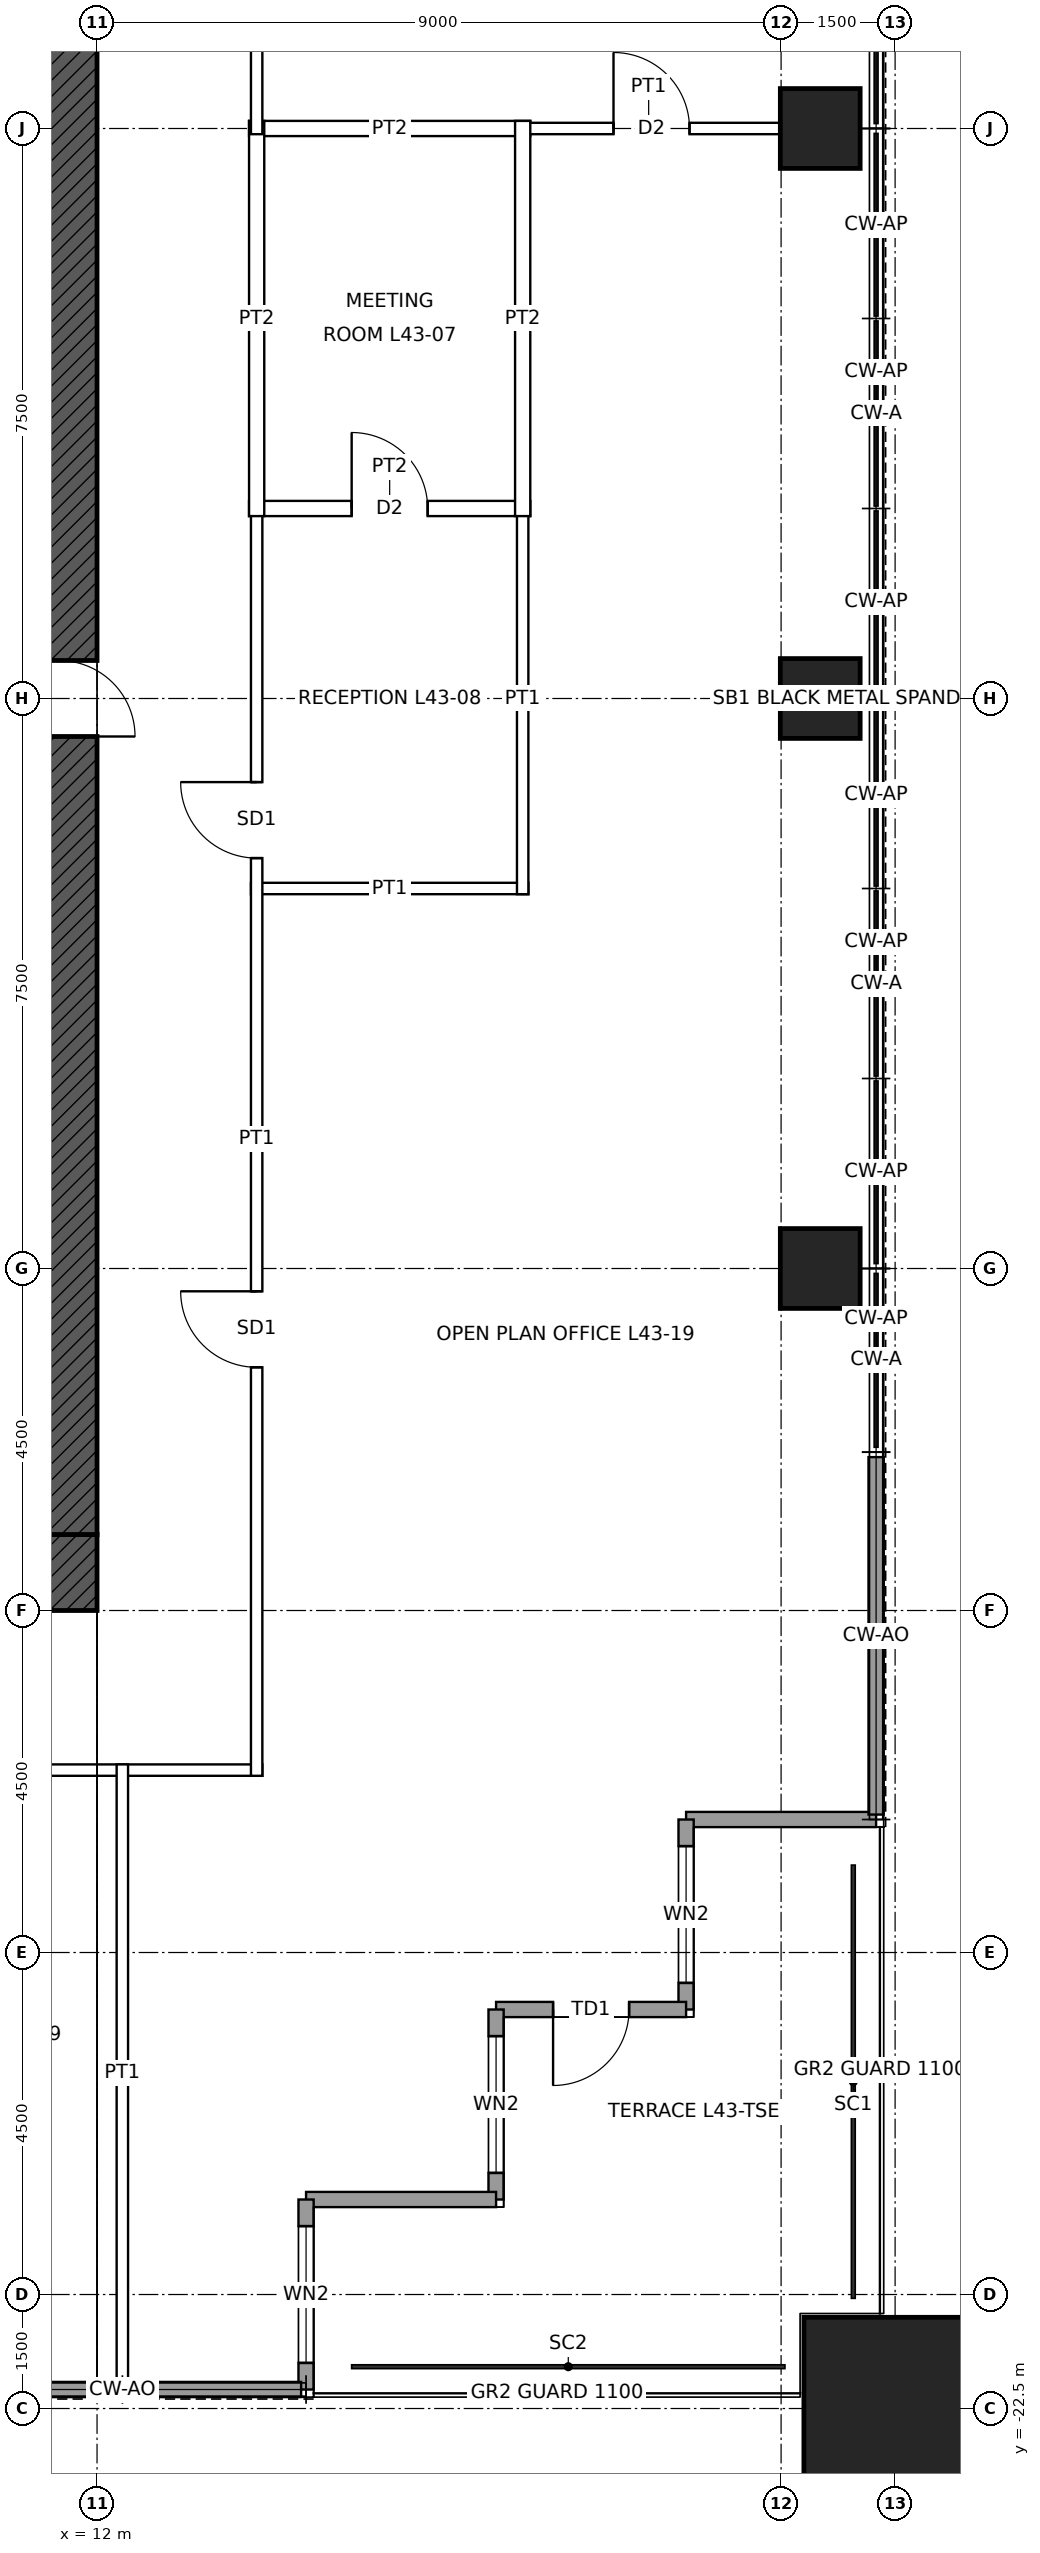
"""IFC4 building model, lengths in metres.
Left out: names, types, materials, properties, quantities, classifications, styles, units other than length and angle.
Written with IfcOpenShell. Run it as: python <this file> out.ifc"""

import sys

from ifc_helpers import new_model, si_unit, direction, frame, frame_2d, origin, origin_2d, place, context, subcontext, project, spatial, rectangle, hollow_rectangle, extrude, element, fill, save


model = new_model("IFC4")
c1 = context("Model", 3, precision=1e-05, world=origin(), true_north=direction((0.0, 1.0)))
c2 = subcontext(c1, "Body", "Model", "MODEL_VIEW")
j1 = project(units=[si_unit("LENGTHUNIT", "METRE"), si_unit("PLANEANGLEUNIT", "RADIAN")], contexts=[c1])
p1 = place(None, origin())
s1 = spatial("IfcSite", under=j1, at=p1, CompositionType="ELEMENT")
p2 = place(p1, origin())
s2 = spatial("IfcBuilding", under=s1, at=p2, CompositionType="ELEMENT")
p3 = place(p2, frame((0.0, 0.0, 205.9)))
s3 = spatial("IfcBuildingStorey", under=s2, at=p3, CompositionType="ELEMENT", Elevation=205.9)
p4 = place(p3, frame((22.5, -22.5, 0.0), z_axis=(0.0, 0.0, 1.0), x_axis=(1.0, 0.0, 0.0)))
e1 = element("IfcColumn", 1, at=p4, inside=s3, PredefinedType="COLUMN", context=c2, shape_type="SweptSolid", body=[
    extrude(hollow_rectangle(XDim=2.4, YDim=2.4, WallThickness=0.12, at=origin_2d()), origin(), (0.0, 0.0, 1.0), 4.0),
])
for number, where, z_axis, x_axis in (
    (2, (21.515, 7.5, 0.0), (0.0, 0.0, 1.0), (1.0, 0.0, 0.0)),
    (3, (21.515, 0.0, 0.0), (0.0, 0.0, 1.0), (1.0, 0.0, 0.0)),
    (4, (21.515, -7.5, 0.0), (0.0, 0.0, 1.0), (1.0, 0.0, 0.0)),
):
    element("IfcColumn", number, at=place(p3, frame(where, z_axis=z_axis, x_axis=x_axis)), inside=s3, PredefinedType="COLUMN", context=c2, shape_type="SweptSolid", body=[
        extrude(hollow_rectangle(XDim=1.05, YDim=1.05, WallThickness=0.07, at=origin_2d()), origin(), (0.0, 0.0, 1.0), 4.0),
    ])
p5 = place(p3, frame((12.0, -11.5, 0.0), z_axis=(0.0, 0.0, 1.0), x_axis=(-1.0, 0.0, 0.0)))
e5 = element("IfcWall", 5, at=p5, inside=s3, PredefinedType="SHEAR", context=c2, shape_type="SweptSolid", body=[
    extrude(rectangle(XDim=24.0, YDim=1.0, at=frame_2d((12.0, 0.0))), origin(), (0.0, 0.0, 1.0), 4.0),
])
p6 = place(p5, frame((11.5, 0.0, 0.0)))
e6 = element("IfcOpeningElement", 6, at=p6, cuts=e5, PredefinedType="OPENING", context=c2, shape_type="SweptSolid", body=[
    extrude(rectangle(XDim=1.0, YDim=2.1, at=frame_2d((0.5, 1.05))), frame((0.0, 0.51, 0.0), z_axis=(0.0, -1.0, 0.0), x_axis=(1.0, 0.0, 0.0)), (0.0, 0.0, 1.0), 1.02),
])
p7 = place(p5, frame((1.0, 0.0, 0.0)))
e7 = element("IfcOpeningElement", 7, at=p7, cuts=e5, PredefinedType="OPENING", context=c2, shape_type="SweptSolid", body=[
    extrude(rectangle(XDim=1.0, YDim=2.4, at=frame_2d((0.5, 1.2))), frame((0.0, 0.51, 0.0), z_axis=(0.0, -1.0, 0.0), x_axis=(1.0, 0.0, 0.0)), (0.0, 0.0, 1.0), 1.02),
])
p8 = place(p3, frame((11.5, 11.0, 0.0), z_axis=(0.0, 0.0, 1.0), x_axis=(0.0, -1.0, 0.0)))
e8 = element("IfcWall", 8, at=p8, inside=s3, PredefinedType="SHEAR", context=c2, shape_type="SweptSolid", body=[
    extrude(rectangle(XDim=22.0, YDim=1.0, at=frame_2d((11.0, 0.0))), origin(), (0.0, 0.0, 1.0), 4.0),
])
p9 = place(p8, frame((10.5, 0.0, 0.0)))
e9 = element("IfcOpeningElement", 9, at=p9, cuts=e8, PredefinedType="OPENING", context=c2, shape_type="SweptSolid", body=[
    extrude(rectangle(XDim=1.0, YDim=2.4, at=frame_2d((0.5, 1.2))), frame((0.0, 0.51, 0.0), z_axis=(0.0, -1.0, 0.0), x_axis=(1.0, 0.0, 0.0)), (0.0, 0.0, 1.0), 1.02),
])
p10 = place(p3, frame((22.25, -14.75, 0.0), z_axis=(0.0, 0.0, 1.0), x_axis=(-1.0, 0.0, 0.0)))
e10 = element("IfcWall", 10, at=p10, inside=s3, PredefinedType="SOLIDWALL", context=c2, shape_type="SweptSolid", body=[
    extrude(rectangle(XDim=2.5, YDim=0.2, at=frame_2d((1.25, 0.0))), origin(), (0.0, 0.0, 1.0), 3.85),
])
p11 = place(p3, frame((19.75, -14.75, 0.0), z_axis=(0.0, 0.0, 1.0), x_axis=(0.0, -1.0, 0.0)))
e11 = element("IfcWall", 11, at=p11, inside=s3, PredefinedType="SOLIDWALL", context=c2, shape_type="SweptSolid", body=[
    extrude(rectangle(XDim=2.5, YDim=0.2, at=frame_2d((1.25, 0.0))), origin(), (0.0, 0.0, 1.0), 3.85),
])
p12 = place(p11, frame((0.35, 0.0, 0.3)))
e12 = element("IfcOpeningElement", 12, at=p12, cuts=e11, PredefinedType="OPENING", context=c2, shape_type="SweptSolid", body=[
    extrude(rectangle(XDim=1.8, YDim=2.4, at=frame_2d((0.9, 1.2))), frame((0.0, 0.11, 0.0), z_axis=(0.0, -1.0, 0.0), x_axis=(1.0, 0.0, 0.0)), (0.0, 0.0, 1.0), 0.22),
])
p13 = place(p3, frame((19.75, -17.25, 0.0), z_axis=(0.0, 0.0, 1.0), x_axis=(-1.0, 0.0, 0.0)))
e13 = element("IfcWall", 13, at=p13, inside=s3, PredefinedType="SOLIDWALL", context=c2, shape_type="SweptSolid", body=[
    extrude(rectangle(XDim=2.5, YDim=0.2, at=frame_2d((1.25, 0.0))), origin(), (0.0, 0.0, 1.0), 3.85),
])
p14 = place(p13, frame((0.75, 0.0, 0.0)))
e14 = element("IfcOpeningElement", 14, at=p14, cuts=e13, PredefinedType="OPENING", context=c2, shape_type="SweptSolid", body=[
    extrude(rectangle(XDim=1.0, YDim=2.4, at=frame_2d((0.5, 1.2))), frame((0.0, 0.11, 0.0), z_axis=(0.0, -1.0, 0.0), x_axis=(1.0, 0.0, 0.0)), (0.0, 0.0, 1.0), 0.22),
])
p15 = place(p3, frame((17.25, -17.25, 0.0), z_axis=(0.0, 0.0, 1.0), x_axis=(0.0, -1.0, 0.0)))
e15 = element("IfcWall", 15, at=p15, inside=s3, PredefinedType="SOLIDWALL", context=c2, shape_type="SweptSolid", body=[
    extrude(rectangle(XDim=2.5, YDim=0.2, at=frame_2d((1.25, 0.0))), origin(), (0.0, 0.0, 1.0), 3.85),
])
p16 = place(p15, frame((0.35, 0.0, 0.3)))
e16 = element("IfcOpeningElement", 16, at=p16, cuts=e15, PredefinedType="OPENING", context=c2, shape_type="SweptSolid", body=[
    extrude(rectangle(XDim=1.8, YDim=2.4, at=frame_2d((0.9, 1.2))), frame((0.0, 0.11, 0.0), z_axis=(0.0, -1.0, 0.0), x_axis=(1.0, 0.0, 0.0)), (0.0, 0.0, 1.0), 0.22),
])
p17 = place(p3, frame((17.25, -19.75, 0.0), z_axis=(0.0, 0.0, 1.0), x_axis=(-1.0, 0.0, 0.0)))
e17 = element("IfcWall", 17, at=p17, inside=s3, PredefinedType="SOLIDWALL", context=c2, shape_type="SweptSolid", body=[
    extrude(rectangle(XDim=2.5, YDim=0.2, at=frame_2d((1.25, 0.0))), origin(), (0.0, 0.0, 1.0), 3.85),
])
p18 = place(p3, frame((14.75, -19.75, 0.0), z_axis=(0.0, 0.0, 1.0), x_axis=(0.0, -1.0, 0.0)))
e18 = element("IfcWall", 18, at=p18, inside=s3, PredefinedType="SOLIDWALL", context=c2, shape_type="SweptSolid", body=[
    extrude(rectangle(XDim=2.5, YDim=0.2, at=frame_2d((1.25, 0.0))), origin(), (0.0, 0.0, 1.0), 3.85),
])
p19 = place(p18, frame((0.35, 0.0, 0.3)))
e19 = element("IfcOpeningElement", 19, at=p19, cuts=e18, PredefinedType="OPENING", context=c2, shape_type="SweptSolid", body=[
    extrude(rectangle(XDim=1.8, YDim=2.4, at=frame_2d((0.9, 1.2))), frame((0.0, 0.11, 0.0), z_axis=(0.0, -1.0, 0.0), x_axis=(1.0, 0.0, 0.0)), (0.0, 0.0, 1.0), 0.22),
])
for number, where, z_axis, x_axis in (
    (20, (22.25, -9.982, 0.0), (0.0, 0.0, 1.0), (0.0, -1.0, 0.0)),
    (21, (22.25, -12.366, 0.0), (0.0, 0.0, 1.0), (0.0, -1.0, 0.0)),
    (22, (14.685, -22.25, 0.0), (0.0, 0.0, 1.0), (-1.0, 0.0, 0.0)),
    (23, (12.301, -22.25, 0.0), (0.0, 0.0, 1.0), (-1.0, 0.0, 0.0)),
):
    element("IfcWall", number, at=place(p3, frame(where, z_axis=z_axis, x_axis=x_axis)), inside=s3, PredefinedType="SOLIDWALL", context=c2, shape_type="SweptSolid", body=[
        extrude(rectangle(XDim=2.319, YDim=0.2, at=frame_2d((1.16, 0.0))), origin(), (0.0, 0.0, 1.0), 3.85),
    ])
p20 = place(p3, frame((-14.175, -14.1, 0.0), z_axis=(0.0, 0.0, 1.0), x_axis=(1.0, 0.0, 0.0)))
e24 = element("IfcWall", 24, at=p20, inside=s3, PredefinedType="PARTITIONING", context=c2, shape_type="SweptSolid", body=[
    extrude(rectangle(XDim=28.35, YDim=0.15, at=frame_2d((14.175, 0.0))), origin(), (0.0, 0.0, 1.0), 3.85),
])
p21 = place(p20, frame((7.425, 0.0, 0.0)))
e25 = element("IfcOpeningElement", 25, at=p21, cuts=e24, PredefinedType="OPENING", context=c2, shape_type="SweptSolid", body=[
    extrude(rectangle(XDim=1.0, YDim=2.4, at=frame_2d((0.5, 1.2))), frame((0.0, 0.085, 0.0), z_axis=(0.0, -1.0, 0.0), x_axis=(1.0, 0.0, 0.0)), (0.0, 0.0, 1.0), 0.17),
])
p22 = place(p20, frame((16.175, 0.0, 0.0)))
e26 = element("IfcOpeningElement", 26, at=p22, cuts=e24, PredefinedType="OPENING", context=c2, shape_type="SweptSolid", body=[
    extrude(rectangle(XDim=1.0, YDim=2.4, at=frame_2d((0.5, 1.2))), frame((0.0, 0.085, 0.0), z_axis=(0.0, -1.0, 0.0), x_axis=(1.0, 0.0, 0.0)), (0.0, 0.0, 1.0), 0.17),
])
p23 = place(p3, frame((14.025, -2.5, 0.0), z_axis=(0.0, 0.0, 1.0), x_axis=(1.0, 0.0, 0.0)))
e27 = element("IfcWall", 27, at=p23, inside=s3, PredefinedType="PARTITIONING", context=c2, shape_type="SweptSolid", body=[
    extrude(rectangle(XDim=3.65, YDim=0.15, at=frame_2d((1.825, 0.0))), origin(), (0.0, 0.0, 1.0), 3.85),
])
p24 = place(p3, frame((14.0, 2.5, 0.0), z_axis=(0.0, 0.0, 1.0), x_axis=(1.0, 0.0, 0.0)))
e28 = element("IfcWall", 28, at=p24, inside=s3, PredefinedType="PARTITIONING", context=c2, shape_type="SweptSolid", body=[
    extrude(rectangle(XDim=3.7, YDim=0.2, at=frame_2d((1.85, 0.0))), origin(), (0.0, 0.0, 1.0), 3.85),
])
p25 = place(p24, frame((1.35, 0.0, 0.0)))
e29 = element("IfcOpeningElement", 29, at=p25, cuts=e28, PredefinedType="OPENING", context=c2, shape_type="SweptSolid", body=[
    extrude(rectangle(XDim=1.0, YDim=2.1, at=frame_2d((0.5, 1.05))), frame((0.0, 0.11, 0.0), z_axis=(0.0, -1.0, 0.0), x_axis=(1.0, 0.0, 0.0)), (0.0, 0.0, 1.0), 0.22),
])
p26 = place(p3, frame((14.0, 7.5, 0.0), z_axis=(0.0, 0.0, 1.0), x_axis=(1.0, 0.0, 0.0)))
e30 = element("IfcWall", 30, at=p26, inside=s3, PredefinedType="PARTITIONING", context=c2, shape_type="SweptSolid", body=[
    extrude(rectangle(XDim=3.7, YDim=0.2, at=frame_2d((1.85, 0.0))), origin(), (0.0, 0.0, 1.0), 3.238),
])
p27 = place(p3, frame((17.525, 7.5, 0.0), z_axis=(0.0, 0.0, 1.0), x_axis=(1.0, 0.0, 0.0)))
e31 = element("IfcWall", 31, at=p27, inside=s3, PredefinedType="PARTITIONING", context=c2, shape_type="SweptSolid", body=[
    extrude(rectangle(XDim=3.465, YDim=0.15, at=frame_2d((1.732, 0.0))), origin(), (0.0, 0.0, 1.0), 3.238),
])
p28 = place(p27, frame((1.27, 0.0, 0.0)))
e32 = element("IfcOpeningElement", 32, at=p28, cuts=e31, PredefinedType="OPENING", context=c2, shape_type="SweptSolid", body=[
    extrude(rectangle(XDim=1.0, YDim=2.1, at=frame_2d((0.5, 1.05))), frame((0.0, 0.085, 0.0), z_axis=(0.0, -1.0, 0.0), x_axis=(1.0, 0.0, 0.0)), (0.0, 0.0, 1.0), 0.17),
])
p29 = place(p3, frame((12.333, -22.15, 0.0), z_axis=(0.0, 0.0, 1.0), x_axis=(0.0, 1.0, 0.0)))
e33 = element("IfcWall", 33, at=p29, inside=s3, PredefinedType="PARTITIONING", context=c2, shape_type="SweptSolid", body=[
    extrude(rectangle(XDim=8.125, YDim=0.15, at=frame_2d((4.062, 0.0))), origin(), (0.0, 0.0, 1.0), 3.85),
])
p30 = place(p3, frame((14.1, -14.175, 0.0), z_axis=(0.0, 0.0, 1.0), x_axis=(0.0, 1.0, 0.0)))
e34 = element("IfcWall", 34, at=p30, inside=s3, PredefinedType="PARTITIONING", context=c2, shape_type="SweptSolid", body=[
    extrude(rectangle(XDim=16.75, YDim=0.15, at=frame_2d((8.375, 0.0))), origin(), (0.0, 0.0, 1.0), 3.85),
])
p31 = place(p30, frame((12.075, 0.0, 0.0)))
e35 = element("IfcOpeningElement", 35, at=p31, cuts=e34, PredefinedType="OPENING", context=c2, shape_type="SweptSolid", body=[
    extrude(rectangle(XDim=1.0, YDim=2.4, at=frame_2d((0.5, 1.2))), frame((0.0, 0.085, 0.0), z_axis=(0.0, -1.0, 0.0), x_axis=(1.0, 0.0, 0.0)), (0.0, 0.0, 1.0), 0.17),
])
p32 = place(p30, frame((5.375, 0.0, 0.0)))
e36 = element("IfcOpeningElement", 36, at=p32, cuts=e34, PredefinedType="OPENING", context=c2, shape_type="SweptSolid", body=[
    extrude(rectangle(XDim=1.0, YDim=2.4, at=frame_2d((0.5, 1.2))), frame((0.0, 0.085, 0.0), z_axis=(0.0, -1.0, 0.0), x_axis=(1.0, 0.0, 0.0)), (0.0, 0.0, 1.0), 0.17),
])
p33 = place(p3, frame((14.1, 2.4, 0.0), z_axis=(0.0, 0.0, 1.0), x_axis=(0.0, 1.0, 0.0)))
e37 = element("IfcWall", 37, at=p33, inside=s3, PredefinedType="PARTITIONING", context=c2, shape_type="SweptSolid", body=[
    extrude(rectangle(XDim=5.2, YDim=0.2, at=frame_2d((2.6, 0.0))), origin(), (0.0, 0.0, 1.0), 3.85),
])
p34 = place(p3, frame((14.1, 7.425, 0.0), z_axis=(0.0, 0.0, 1.0), x_axis=(0.0, 1.0, 0.0)))
e38 = element("IfcWall", 38, at=p34, inside=s3, PredefinedType="PARTITIONING", context=c2, shape_type="SweptSolid", body=[
    extrude(rectangle(XDim=6.75, YDim=0.15, at=frame_2d((3.375, 0.0))), origin(), (0.0, 0.0, 1.0), 3.85),
])
p35 = place(p3, frame((17.6, -2.575, 0.0), z_axis=(0.0, 0.0, 1.0), x_axis=(0.0, 1.0, 0.0)))
e39 = element("IfcWall", 39, at=p35, inside=s3, PredefinedType="PARTITIONING", context=c2, shape_type="SweptSolid", body=[
    extrude(rectangle(XDim=5.15, YDim=0.15, at=frame_2d((2.575, 0.0))), origin(), (0.0, 0.0, 1.0), 3.85),
])
p36 = place(p3, frame((17.6, 2.4, 0.0), z_axis=(0.0, 0.0, 1.0), x_axis=(0.0, 1.0, 0.0)))
e40 = element("IfcWall", 40, at=p36, inside=s3, PredefinedType="PARTITIONING", context=c2, shape_type="SweptSolid", body=[
    extrude(rectangle(XDim=5.2, YDim=0.2, at=frame_2d((2.6, 0.0))), origin(), (0.0, 0.0, 1.0), 3.85),
])
p37 = place(p12, origin())
e41 = element("IfcWindow", 41, at=p37, inside=s3, PartitioningType="SINGLE_PANEL", PredefinedType="WINDOW", context=c2, shape_type="SweptSolid", body=[
    extrude(rectangle(XDim=1.8, YDim=2.4, at=frame_2d((0.9, 1.2))), frame((0.0, 0.03, 0.0), z_axis=(0.0, -1.0, 0.0), x_axis=(1.0, 0.0, 0.0)), (0.0, 0.0, 1.0), 0.06),
])
fill(e12, e41)
p38 = place(p14, origin())
e42 = element("IfcDoor", 42, at=p38, inside=s3, OperationType="SINGLE_SWING_RIGHT", PredefinedType="DOOR", context=c2, shape_type="SweptSolid", body=[
    extrude(rectangle(XDim=1.0, YDim=2.4, at=frame_2d((0.5, 1.2))), frame((0.0, 0.025, 0.0), z_axis=(0.0, -1.0, 0.0), x_axis=(1.0, 0.0, 0.0)), (0.0, 0.0, 1.0), 0.05),
])
fill(e14, e42)
p39 = place(p16, origin())
e43 = element("IfcWindow", 43, at=p39, inside=s3, PartitioningType="SINGLE_PANEL", PredefinedType="WINDOW", context=c2, shape_type="SweptSolid", body=[
    extrude(rectangle(XDim=1.8, YDim=2.4, at=frame_2d((0.9, 1.2))), frame((0.0, 0.03, 0.0), z_axis=(0.0, -1.0, 0.0), x_axis=(1.0, 0.0, 0.0)), (0.0, 0.0, 1.0), 0.06),
])
fill(e16, e43)
p40 = place(p19, origin())
e44 = element("IfcWindow", 44, at=p40, inside=s3, PartitioningType="SINGLE_PANEL", PredefinedType="WINDOW", context=c2, shape_type="SweptSolid", body=[
    extrude(rectangle(XDim=1.8, YDim=2.4, at=frame_2d((0.9, 1.2))), frame((0.0, 0.03, 0.0), z_axis=(0.0, -1.0, 0.0), x_axis=(1.0, 0.0, 0.0)), (0.0, 0.0, 1.0), 0.06),
])
fill(e19, e44)
p41 = place(p9, origin())
e45 = element("IfcDoor", 45, at=p41, inside=s3, OperationType="SINGLE_SWING_RIGHT", PredefinedType="DOOR", context=c2, shape_type="SweptSolid", body=[
    extrude(rectangle(XDim=1.0, YDim=2.4, at=frame_2d((0.5, 1.2))), frame((0.0, 0.485, 0.0), z_axis=(0.0, -1.0, 0.0), x_axis=(1.0, 0.0, 0.0)), (0.0, 0.0, 1.0), 0.05),
])
fill(e9, e45)
p42 = place(p28, origin())
e46 = element("IfcDoor", 46, at=p42, inside=s3, OperationType="SINGLE_SWING_LEFT", PredefinedType="DOOR", context=c2, shape_type="SweptSolid", body=[
    extrude(rectangle(XDim=1.0, YDim=2.1, at=frame_2d((0.5, 1.05))), frame((0.0, 0.025, 0.0), z_axis=(0.0, -1.0, 0.0), x_axis=(1.0, 0.0, 0.0)), (0.0, 0.0, 1.0), 0.05),
])
fill(e32, e46)
p43 = place(p25, origin())
e47 = element("IfcDoor", 47, at=p43, inside=s3, OperationType="SINGLE_SWING_LEFT", PredefinedType="DOOR", context=c2, shape_type="SweptSolid", body=[
    extrude(rectangle(XDim=1.0, YDim=2.1, at=frame_2d((0.5, 1.05))), frame((0.0, 0.025, 0.0), z_axis=(0.0, -1.0, 0.0), x_axis=(1.0, 0.0, 0.0)), (0.0, 0.0, 1.0), 0.05),
])
fill(e29, e47)
p44 = place(p31, origin())
e48 = element("IfcDoor", 48, at=p44, inside=s3, OperationType="SINGLE_SWING_RIGHT", PredefinedType="DOOR", context=c2, shape_type="SweptSolid", body=[
    extrude(rectangle(XDim=1.0, YDim=2.4, at=frame_2d((0.5, 1.2))), frame((0.0, 0.025, 0.0), z_axis=(0.0, -1.0, 0.0), x_axis=(1.0, 0.0, 0.0)), (0.0, 0.0, 1.0), 0.05),
])
fill(e35, e48)
p45 = place(p32, origin())
e49 = element("IfcDoor", 49, at=p45, inside=s3, OperationType="SINGLE_SWING_RIGHT", PredefinedType="DOOR", context=c2, shape_type="SweptSolid", body=[
    extrude(rectangle(XDim=1.0, YDim=2.4, at=frame_2d((0.5, 1.2))), frame((0.0, 0.025, 0.0), z_axis=(0.0, -1.0, 0.0), x_axis=(1.0, 0.0, 0.0)), (0.0, 0.0, 1.0), 0.05),
])
fill(e36, e49)
save(model, sys.argv[1])
